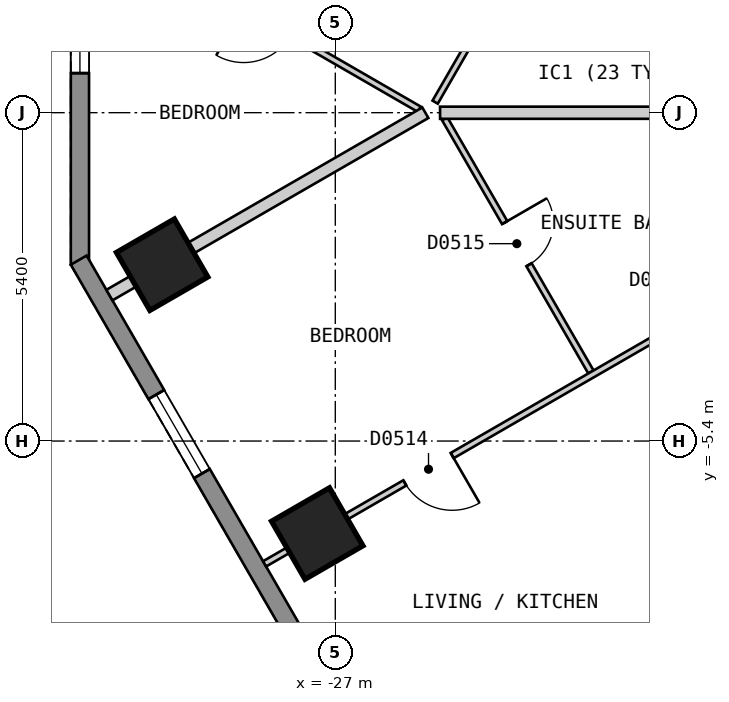
"""IFC4 building model, lengths in metres.
Left out: names, types, materials, properties, quantities, classifications, styles, units other than length and angle.
Written with IfcOpenShell. Run it as: python <this file> out.ifc"""

import sys

from ifc_helpers import new_model, si_unit, direction, frame, frame_2d, origin, origin_2d, place, context, subcontext, project, spatial, polyline, rectangle, outline, extrude, element, fill, save


model = new_model("IFC4")
c1 = context("Model", 3, precision=1e-05, world=origin(), true_north=direction((0.0, 1.0)))
c2 = subcontext(c1, "Body", "Model", "MODEL_VIEW")
j1 = project(units=[si_unit("LENGTHUNIT", "METRE"), si_unit("PLANEANGLEUNIT", "RADIAN")], contexts=[c1])
p1 = place(None, origin())
s1 = spatial("IfcSite", under=j1, at=p1, CompositionType="ELEMENT")
p2 = place(p1, origin())
s2 = spatial("IfcBuilding", under=s1, at=p2, CompositionType="ELEMENT")
p3 = place(p2, frame((0.0, 0.0, 56.4)))
s3 = spatial("IfcBuildingStorey", under=s2, at=p3, CompositionType="ELEMENT", Elevation=56.4)
for number, where, z_axis, x_axis in (
    (1, (-29.848, -2.5, 0.0), (0.0, 0.0, 1.0), (0.5, -0.866, 0.0)),
    (2, (-27.297, -6.921, 0.0), (0.0, 0.0, 1.0), (0.5, -0.866, 0.0)),
):
    element("IfcColumn", number, at=place(p3, frame(where, z_axis=z_axis, x_axis=x_axis)), inside=s3, PredefinedType="COLUMN", context=c2, shape_type="SweptSolid", body=[
        extrude(rectangle(XDim=1.1, YDim=1.1, at=origin_2d()), origin(), (0.0, 0.0, 1.0), 3.0),
    ])
p4 = place(p3, frame((-31.2, 2.5, 0.0), z_axis=(0.0, 0.0, 1.0), x_axis=(0.0, -1.0, 0.0)))
e3 = element("IfcWall", 3, at=p4, inside=s3, PredefinedType="SOLIDWALL", context=c2, shape_type="SweptSolid", body=[
    extrude(outline(polyline([(0.0, -0.15), (5.0, -0.15), (4.92, 0.15), (0.08, 0.15), (0.0, -0.15)])), origin(), (0.0, 0.0, 1.0), 2.7),
])
p5 = place(p4, frame((0.65, 0.0, 0.15)))
e4 = element("IfcOpeningElement", 4, at=p5, cuts=e3, PredefinedType="OPENING", context=c2, shape_type="SweptSolid", body=[
    extrude(rectangle(XDim=1.2, YDim=2.1, at=frame_2d((0.6, 1.05))), frame((0.0, 0.16, 0.0), z_axis=(0.0, -1.0, 0.0), x_axis=(1.0, 0.0, 0.0)), (0.0, 0.0, 1.0), 0.32),
])
p6 = place(p3, frame((-31.22, -2.425, 0.0), z_axis=(0.0, 0.0, 1.0), x_axis=(0.500001938803, -0.866024284413, 0.0)))
e5 = element("IfcWall", 5, at=p6, inside=s3, PredefinedType="SOLIDWALL", context=c2, shape_type="SweptSolid", body=[
    extrude(outline(polyline([(0.0, -0.15), (27.02, -0.15), (26.94, 0.15), (0.08, 0.15), (0.0, -0.15)])), origin(), (0.0, 0.0, 1.0), 2.7),
])
p7 = place(p6, frame((2.553, 0.0, 0.15)))
e6 = element("IfcOpeningElement", 6, at=p7, cuts=e5, PredefinedType="OPENING", context=c2, shape_type="SweptSolid", body=[
    extrude(rectangle(XDim=1.5, YDim=2.1, at=frame_2d((0.75, 1.05))), frame((0.0, 0.16, 0.0), z_axis=(0.0, -1.0, 0.0), x_axis=(1.0, 0.0, 0.0)), (0.0, 0.0, 1.0), 0.32),
])
p8 = place(p6, frame((7.657, 0.0, 0.15)))
e7 = element("IfcOpeningElement", 7, at=p8, cuts=e5, PredefinedType="OPENING", context=c2, shape_type="SweptSolid", body=[
    extrude(rectangle(XDim=1.5, YDim=2.1, at=frame_2d((0.75, 1.05))), frame((0.0, 0.16, 0.0), z_axis=(0.0, -1.0, 0.0), x_axis=(1.0, 0.0, 0.0)), (0.0, 0.0, 1.0), 0.32),
])
p9 = place(p6, frame((12.761, 0.0, 0.15)))
e8 = element("IfcOpeningElement", 8, at=p9, cuts=e5, PredefinedType="OPENING", context=c2, shape_type="SweptSolid", body=[
    extrude(rectangle(XDim=1.5, YDim=2.1, at=frame_2d((0.75, 1.05))), frame((0.0, 0.16, 0.0), z_axis=(0.0, -1.0, 0.0), x_axis=(1.0, 0.0, 0.0)), (0.0, 0.0, 1.0), 0.32),
])
p10 = place(p6, frame((17.865, 0.0, 0.15)))
e9 = element("IfcOpeningElement", 9, at=p10, cuts=e5, PredefinedType="OPENING", context=c2, shape_type="SweptSolid", body=[
    extrude(rectangle(XDim=1.5, YDim=2.1, at=frame_2d((0.75, 1.05))), frame((0.0, 0.16, 0.0), z_axis=(0.0, -1.0, 0.0), x_axis=(1.0, 0.0, 0.0)), (0.0, 0.0, 1.0), 0.32),
])
p11 = place(p6, frame((22.969, 0.0, 0.15)))
e10 = element("IfcOpeningElement", 10, at=p11, cuts=e5, PredefinedType="OPENING", context=c2, shape_type="SweptSolid", body=[
    extrude(rectangle(XDim=1.5, YDim=2.1, at=frame_2d((0.75, 1.05))), frame((0.0, 0.16, 0.0), z_axis=(0.0, -1.0, 0.0), x_axis=(1.0, 0.0, 0.0)), (0.0, 0.0, 1.0), 0.32),
])
p12 = place(p3, frame((-25.2, -0.101, 0.0), z_axis=(0.0, 0.0, 1.0), x_axis=(0.500099052605, -0.865968208183, 0.0)))
e11 = element("IfcWall", 11, at=p12, inside=s3, PredefinedType="PARTITIONING", context=c2, shape_type="SweptSolid", body=[
    extrude(rectangle(XDim=4.807, YDim=0.1, at=frame_2d((2.404, 0.0))), origin(), (0.0, 0.0, 1.0), 2.7),
])
p13 = place(p12, frame((1.971, 0.0, 0.0)))
e12 = element("IfcOpeningElement", 12, at=p13, cuts=e11, PredefinedType="OPENING", context=c2, shape_type="SweptSolid", body=[
    extrude(rectangle(XDim=0.8, YDim=2.1, at=frame_2d((0.4, 1.05))), frame((0.0, 0.06, 0.0), z_axis=(0.0, -1.0, 0.0), x_axis=(1.0, 0.0, 0.0)), (0.0, 0.0, 1.0), 0.12),
])
p14 = place(p3, frame((-30.716, 2.999, 0.0), z_axis=(0.0, 0.0, 1.0), x_axis=(0.866025981722, -0.499998998981, 0.0)))
e13 = element("IfcWall", 13, at=p14, inside=s3, PredefinedType="PARTITIONING", context=c2, shape_type="SweptSolid", body=[
    extrude(rectangle(XDim=5.884, YDim=0.1, at=frame_2d((2.942, 0.0))), origin(), (0.0, 0.0, 1.0), 2.7),
])
p15 = place(p14, frame((2.55, 0.0, 0.0)))
e14 = element("IfcOpeningElement", 14, at=p15, cuts=e13, PredefinedType="OPENING", context=c2, shape_type="SweptSolid", body=[
    extrude(rectangle(XDim=0.9, YDim=2.1, at=frame_2d((0.45, 1.05))), frame((0.0, 0.06, 0.0), z_axis=(0.0, -1.0, 0.0), x_axis=(1.0, 0.0, 0.0)), (0.0, 0.0, 1.0), 0.12),
])
p16 = place(p3, frame((-25.358, 0.173, 0.0), z_axis=(0.0, 0.0, 1.0), x_axis=(0.500180754623, 0.8659210199, 0.0)))
e15 = element("IfcWall", 15, at=p16, inside=s3, PredefinedType="PARTITIONING", context=c2, shape_type="SweptSolid", body=[
    extrude(rectangle(XDim=4.872, YDim=0.1, at=frame_2d((2.436, 0.0))), origin(), (0.0, 0.0, 1.0), 2.7),
])
p17 = place(p16, frame((1.936, 0.0, 0.0)))
e16 = element("IfcOpeningElement", 16, at=p17, cuts=e15, PredefinedType="OPENING", context=c2, shape_type="SweptSolid", body=[
    extrude(rectangle(XDim=0.8, YDim=2.1, at=frame_2d((0.4, 1.05))), frame((0.0, 0.06, 0.0), z_axis=(0.0, -1.0, 0.0), x_axis=(1.0, 0.0, 0.0)), (0.0, 0.0, 1.0), 0.12),
])
p18 = place(p3, frame((-28.163, -7.42, 0.0), z_axis=(0.0, 0.0, 1.0), x_axis=(0.866065245018, 0.499930986609, 0.0)))
e17 = element("IfcWall", 17, at=p18, inside=s3, PredefinedType="PARTITIONING", context=c2, shape_type="SweptSolid", body=[
    extrude(rectangle(XDim=10.0, YDim=0.1, at=frame_2d((5.0, 0.0))), origin(), (0.0, 0.0, 1.0), 2.7),
])
p19 = place(p18, frame((2.663, 0.0, 0.0)))
e18 = element("IfcOpeningElement", 18, at=p19, cuts=e17, PredefinedType="OPENING", context=c2, shape_type="SweptSolid", body=[
    extrude(rectangle(XDim=0.9, YDim=2.1, at=frame_2d((0.45, 1.05))), frame((0.0, 0.06, 0.0), z_axis=(0.0, -1.0, 0.0), x_axis=(1.0, 0.0, 0.0)), (0.0, 0.0, 1.0), 0.12),
])
p20 = place(p3, frame((-25.277, -0.001, 0.0), z_axis=(0.0, 0.0, 1.0), x_axis=(1.0, 0.0, 0.0)))
e19 = element("IfcWall", 19, at=p20, inside=s3, PredefinedType="PARTITIONING", context=c2, shape_type="SweptSolid", body=[
    extrude(rectangle(XDim=4.493, YDim=0.2, at=frame_2d((2.247, 0.0))), origin(), (0.0, 0.0, 1.0), 2.7),
])
p21 = place(p3, frame((-30.715, -3.0, 0.0), z_axis=(0.0, 0.0, 1.0), x_axis=(0.86609140076, 0.499885672459, 0.0)))
e20 = element("IfcWall", 20, at=p21, inside=s3, PredefinedType="PARTITIONING", context=c2, shape_type="SweptSolid", body=[
    extrude(rectangle(XDim=6.0, YDim=0.2, at=frame_2d((3.0, 0.0))), origin(), (0.0, 0.0, 1.0), 2.7),
])
p22 = place(p3, frame((-25.61, -11.841, 0.0), z_axis=(0.0, 0.0, 1.0), x_axis=(0.866004715254, 0.500035831874, 0.0)))
e21 = element("IfcWall", 21, at=p22, inside=s3, PredefinedType="PARTITIONING", context=c2, shape_type="SweptSolid", body=[
    extrude(rectangle(XDim=8.43, YDim=0.2, at=frame_2d((4.215, 0.0))), origin(), (0.0, 0.0, 1.0), 2.7),
])
p23 = place(p5, origin())
e22 = element("IfcWindow", 22, at=p23, inside=s3, PartitioningType="SINGLE_PANEL", PredefinedType="WINDOW", context=c2, shape_type="SweptSolid", body=[
    extrude(rectangle(XDim=1.2, YDim=2.1, at=frame_2d((0.6, 1.05))), frame((0.0, 0.03, 0.0), z_axis=(0.0, -1.0, 0.0), x_axis=(1.0, 0.0, 0.0)), (0.0, 0.0, 1.0), 0.06),
])
fill(e4, e22)
p24 = place(p7, origin())
e23 = element("IfcWindow", 23, at=p24, inside=s3, PartitioningType="SINGLE_PANEL", PredefinedType="WINDOW", context=c2, shape_type="SweptSolid", body=[
    extrude(rectangle(XDim=1.5, YDim=2.1, at=frame_2d((0.75, 1.05))), frame((0.0, 0.03, 0.0), z_axis=(0.0, -1.0, 0.0), x_axis=(1.0, 0.0, 0.0)), (0.0, 0.0, 1.0), 0.06),
])
fill(e6, e23)
p25 = place(p19, origin())
e24 = element("IfcDoor", 24, at=p25, inside=s3, OperationType="SINGLE_SWING_RIGHT", PredefinedType="DOOR", context=c2, shape_type="SweptSolid", body=[
    extrude(rectangle(XDim=0.9, YDim=2.1, at=frame_2d((0.45, 1.05))), frame((0.0, 0.025, 0.0), z_axis=(0.0, -1.0, 0.0), x_axis=(1.0, 0.0, 0.0)), (0.0, 0.0, 1.0), 0.05),
])
fill(e18, e24)
p26 = place(p13, origin())
e25 = element("IfcDoor", 25, at=p26, inside=s3, OperationType="SINGLE_SWING_LEFT", PredefinedType="DOOR", context=c2, shape_type="SweptSolid", body=[
    extrude(rectangle(XDim=0.8, YDim=2.1, at=frame_2d((0.4, 1.05))), frame((0.0, 0.025, 0.0), z_axis=(0.0, -1.0, 0.0), x_axis=(1.0, 0.0, 0.0)), (0.0, 0.0, 1.0), 0.05),
])
fill(e12, e25)
save(model, sys.argv[1])
